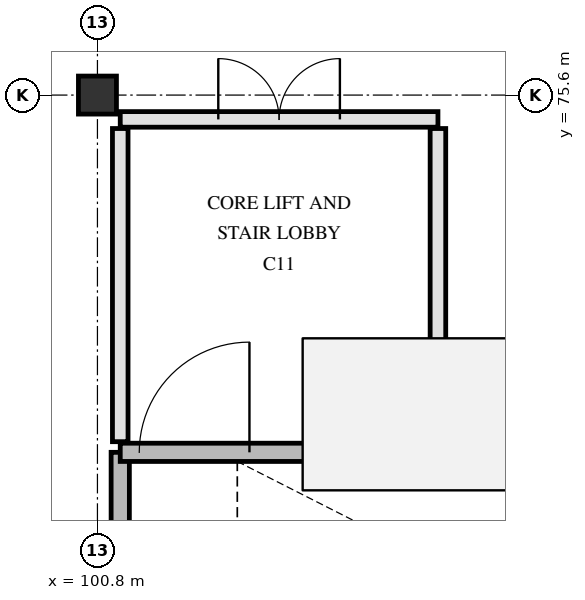
"""IFC4 building model, lengths in metres.
Left out: names, types, materials, properties, quantities, classifications, styles, units other than length and angle.
Written with IfcOpenShell. Run it as: python <this file> out.ifc"""

import sys

from ifc_helpers import new_model, si_unit, direction, frame, frame_2d, origin, origin_2d, place, context, subcontext, project, spatial, rectangle, extrude, element, fill, save


model = new_model("IFC4")
c1 = context("Model", 3, precision=1e-05, world=origin(), true_north=direction((0.0, 1.0)))
c2 = subcontext(c1, "Body", "Model", "MODEL_VIEW")
j1 = project(units=[si_unit("LENGTHUNIT", "METRE"), si_unit("PLANEANGLEUNIT", "RADIAN")], contexts=[c1])
p1 = place(None, origin())
s1 = spatial("IfcSite", under=j1, at=p1, CompositionType="ELEMENT")
p2 = place(p1, origin())
s2 = spatial("IfcBuilding", under=s1, at=p2, CompositionType="ELEMENT")
p3 = place(p2, frame((0.0, 0.0, 30.3)))
s3 = spatial("IfcBuildingStorey", under=s2, at=p3, CompositionType="ELEMENT", Elevation=30.3)
p4 = place(p3, frame((100.8, 75.6, 0.0), z_axis=(0.0, 0.0, 1.0), x_axis=(1.0, 0.0, 0.0)))
e1 = element("IfcColumn", 1, at=p4, inside=s3, PredefinedType="COLUMN", context=c2, shape_type="SweptSolid", body=[
    extrude(rectangle(XDim=0.5, YDim=0.5, at=origin_2d()), origin(), (0.0, 0.0, 1.0), 3.9),
])
p5 = place(p3, frame((101.1, 67.58, 0.0), z_axis=(0.0, 0.0, 1.0), x_axis=(0.0, 1.0, 0.0)))
e2 = element("IfcWall", 2, at=p5, inside=s3, PredefinedType="SHEAR", context=c2, shape_type="SweptSolid", body=[
    extrude(rectangle(XDim=3.32, YDim=0.24, at=frame_2d((1.66, 0.0))), origin(), (0.0, 0.0, 1.0), 3.66),
])
p6 = place(p3, frame((101.1, 70.9, 0.0), z_axis=(0.0, 0.0, 1.0), x_axis=(1.0, 0.0, 0.0)))
e3 = element("IfcWall", 3, at=p6, inside=s3, PredefinedType="SHEAR", context=c2, shape_type="SweptSolid", body=[
    extrude(rectangle(XDim=7.82, YDim=0.24, at=frame_2d((3.91, 0.0))), origin(), (0.0, 0.0, 1.0), 3.66),
])
p7 = place(p6, frame((0.25, 0.0, 0.0)))
e4 = element("IfcOpeningElement", 4, at=p7, cuts=e3, PredefinedType="OPENING", context=c2, shape_type="SweptSolid", body=[
    extrude(rectangle(XDim=1.45, YDim=2.2, at=frame_2d((0.725, 1.1))), frame((0.0, 0.13, 0.0), z_axis=(0.0, -1.0, 0.0), x_axis=(1.0, 0.0, 0.0)), (0.0, 0.0, 1.0), 0.26),
])
for number, where, z_axis, x_axis in (
    (5, (105.28, 71.04, 0.0), (0.0, 0.0, 1.0), (0.0, 1.0, 0.0)),
    (6, (101.1, 71.04, 0.0), (0.0, 0.0, 1.0), (0.0, 1.0, 0.0)),
):
    element("IfcWall", number, at=place(p3, frame(where, z_axis=z_axis, x_axis=x_axis)), inside=s3, PredefinedType="PARTITIONING", context=c2, shape_type="SweptSolid", body=[
        extrude(rectangle(XDim=4.12, YDim=0.205, at=frame_2d((2.06, 0.0))), origin(), (0.0, 0.0, 1.0), 3.65),
    ])
p8 = place(p3, frame((101.1, 75.28, 0.0), z_axis=(0.0, 0.0, 1.0), x_axis=(1.0, 0.0, 0.0)))
e7 = element("IfcWall", 7, at=p8, inside=s3, PredefinedType="PARTITIONING", context=c2, shape_type="SweptSolid", body=[
    extrude(rectangle(XDim=4.18, YDim=0.205, at=frame_2d((2.09, 0.0))), origin(), (0.0, 0.0, 1.0), 3.65),
])
p9 = place(p8, frame((1.29, 0.0, 0.0)))
e8 = element("IfcOpeningElement", 8, at=p9, cuts=e7, PredefinedType="OPENING", context=c2, shape_type="SweptSolid", body=[
    extrude(rectangle(XDim=1.6, YDim=2.25, at=frame_2d((0.8, 1.125))), frame((0.0, 0.113, 0.0), z_axis=(0.0, -1.0, 0.0), x_axis=(1.0, 0.0, 0.0)), (0.0, 0.0, 1.0), 0.225),
])
p10 = place(p7, origin())
e9 = element("IfcDoor", 9, at=p10, inside=s3, OperationType="SINGLE_SWING_RIGHT", PredefinedType="DOOR", context=c2, shape_type="SweptSolid", body=[
    extrude(rectangle(XDim=1.45, YDim=2.2, at=frame_2d((0.725, 1.1))), frame((0.0, 0.025, 0.0), z_axis=(0.0, -1.0, 0.0), x_axis=(1.0, 0.0, 0.0)), (0.0, 0.0, 1.0), 0.05),
])
fill(e4, e9)
p11 = place(p9, origin())
e10 = element("IfcDoor", 10, at=p11, inside=s3, OperationType="DOUBLE_SWING_LEFT", PredefinedType="DOOR", context=c2, shape_type="SweptSolid", body=[
    extrude(rectangle(XDim=1.6, YDim=2.25, at=frame_2d((0.8, 1.125))), frame((0.0, 0.025, 0.0), z_axis=(0.0, -1.0, 0.0), x_axis=(1.0, 0.0, 0.0)), (0.0, 0.0, 1.0), 0.05),
])
fill(e8, e10)
save(model, sys.argv[1])
